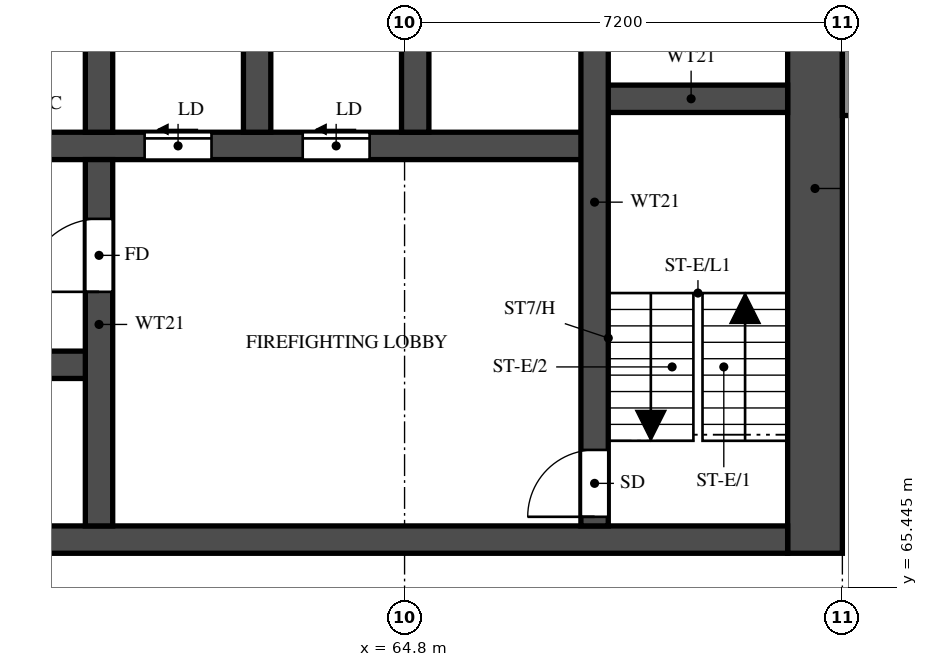
"""IFC4 building model, lengths in metres.
Left out: names, types, materials, properties, quantities, classifications, styles, units other than length and angle.
Written with IfcOpenShell. Run it as: python <this file> out.ifc"""

import sys

from ifc_helpers import new_model, si_unit, direction, frame, frame_2d, origin, place, context, subcontext, project, spatial, rectangle, extrude, element, fill, save


model = new_model("IFC4")
c1 = context("Model", 3, precision=1e-05, world=origin(), true_north=direction((0.0, 1.0)))
c2 = subcontext(c1, "Body", "Model", "MODEL_VIEW")
j1 = project(units=[si_unit("LENGTHUNIT", "METRE"), si_unit("PLANEANGLEUNIT", "RADIAN")], contexts=[c1])
p1 = place(None, origin())
s1 = spatial("IfcSite", under=j1, at=p1, CompositionType="ELEMENT")
p2 = place(p1, origin())
s2 = spatial("IfcBuilding", under=s1, at=p2, CompositionType="ELEMENT")
p3 = place(p2, frame((0.0, 0.0, 58.5)))
s3 = spatial("IfcBuildingStorey", under=s2, at=p3, CompositionType="ELEMENT", Elevation=58.5)
p4 = place(p3, frame((71.55, 66.0, 0.0), z_axis=(0.0, 0.0, 1.0), x_axis=(0.0, 1.0, 0.0)))
e1 = element("IfcWall", 1, at=p4, inside=s3, PredefinedType="SHEAR", context=c2, shape_type="SweptSolid", body=[
    extrude(rectangle(XDim=12.0, YDim=0.9, at=frame_2d((6.0, 0.0))), origin(), (0.0, 0.0, 1.0), 3.18),
])
p5 = place(p3, frame((29.7, 66.225, 0.0), z_axis=(0.0, 0.0, 1.0), x_axis=(1.0, 0.0, 0.0)))
e2 = element("IfcWall", 2, at=p5, inside=s3, PredefinedType="SHEAR", context=c2, shape_type="SweptSolid", body=[
    extrude(rectangle(XDim=41.4, YDim=0.45, at=frame_2d((20.7, 0.0))), origin(), (0.0, 0.0, 1.0), 3.18),
])
p6 = place(p5, frame((0.925, 0.0, 0.0)))
e3 = element("IfcOpeningElement", 3, at=p6, cuts=e2, PredefinedType="OPENING", context=c2, shape_type="SweptSolid", body=[
    extrude(rectangle(XDim=1.1, YDim=2.1, at=frame_2d((0.55, 1.05))), frame((0.0, 0.235, 0.0), z_axis=(0.0, -1.0, 0.0), x_axis=(1.0, 0.0, 0.0)), (0.0, 0.0, 1.0), 0.47),
])
p7 = place(p5, frame((3.738, 0.0, 0.0)))
e4 = element("IfcOpeningElement", 4, at=p7, cuts=e2, PredefinedType="OPENING", context=c2, shape_type="SweptSolid", body=[
    extrude(rectangle(XDim=1.8, YDim=2.1, at=frame_2d((0.9, 1.05))), frame((0.0, 0.235, 0.0), z_axis=(0.0, -1.0, 0.0), x_axis=(1.0, 0.0, 0.0)), (0.0, 0.0, 1.0), 0.47),
])
p8 = place(p3, frame((35.575, 69.1, 0.0), z_axis=(0.0, 0.0, 1.0), x_axis=(1.0, 0.0, 0.0)))
e5 = element("IfcWall", 5, at=p8, inside=s3, PredefinedType="SHEAR", context=c2, shape_type="SweptSolid", body=[
    extrude(rectangle(XDim=24.2, YDim=0.45, at=frame_2d((12.1, 0.0))), origin(), (0.0, 0.0, 1.0), 3.18),
])
p9 = place(p8, frame((1.05, 0.0, 0.0)))
e6 = element("IfcOpeningElement", 6, at=p9, cuts=e5, PredefinedType="OPENING", context=c2, shape_type="SweptSolid", body=[
    extrude(rectangle(XDim=1.1, YDim=2.1, at=frame_2d((0.55, 1.05))), frame((0.0, 0.235, 0.0), z_axis=(0.0, -1.0, 0.0), x_axis=(1.0, 0.0, 0.0)), (0.0, 0.0, 1.0), 0.47),
])
p10 = place(p8, frame((3.8, 0.0, 0.0)))
e7 = element("IfcOpeningElement", 7, at=p10, cuts=e5, PredefinedType="OPENING", context=c2, shape_type="SweptSolid", body=[
    extrude(rectangle(XDim=1.1, YDim=2.1, at=frame_2d((0.55, 1.05))), frame((0.0, 0.235, 0.0), z_axis=(0.0, -1.0, 0.0), x_axis=(1.0, 0.0, 0.0)), (0.0, 0.0, 1.0), 0.47),
])
p11 = place(p8, frame((6.55, 0.0, 0.0)))
e8 = element("IfcOpeningElement", 8, at=p11, cuts=e5, PredefinedType="OPENING", context=c2, shape_type="SweptSolid", body=[
    extrude(rectangle(XDim=1.1, YDim=2.1, at=frame_2d((0.55, 1.05))), frame((0.0, 0.235, 0.0), z_axis=(0.0, -1.0, 0.0), x_axis=(1.0, 0.0, 0.0)), (0.0, 0.0, 1.0), 0.47),
])
p12 = place(p8, frame((9.3, 0.0, 0.0)))
e9 = element("IfcOpeningElement", 9, at=p12, cuts=e5, PredefinedType="OPENING", context=c2, shape_type="SweptSolid", body=[
    extrude(rectangle(XDim=1.1, YDim=2.1, at=frame_2d((0.55, 1.05))), frame((0.0, 0.235, 0.0), z_axis=(0.0, -1.0, 0.0), x_axis=(1.0, 0.0, 0.0)), (0.0, 0.0, 1.0), 0.47),
])
p13 = place(p8, frame((12.05, 0.0, 0.0)))
e10 = element("IfcOpeningElement", 10, at=p13, cuts=e5, PredefinedType="OPENING", context=c2, shape_type="SweptSolid", body=[
    extrude(rectangle(XDim=1.1, YDim=2.1, at=frame_2d((0.55, 1.05))), frame((0.0, 0.235, 0.0), z_axis=(0.0, -1.0, 0.0), x_axis=(1.0, 0.0, 0.0)), (0.0, 0.0, 1.0), 0.47),
])
p14 = place(p8, frame((14.8, 0.0, 0.0)))
e11 = element("IfcOpeningElement", 11, at=p14, cuts=e5, PredefinedType="OPENING", context=c2, shape_type="SweptSolid", body=[
    extrude(rectangle(XDim=1.1, YDim=2.1, at=frame_2d((0.55, 1.05))), frame((0.0, 0.235, 0.0), z_axis=(0.0, -1.0, 0.0), x_axis=(1.0, 0.0, 0.0)), (0.0, 0.0, 1.0), 0.47),
])
p15 = place(p3, frame((32.875, 72.7, 0.0), z_axis=(0.0, 0.0, 1.0), x_axis=(1.0, 0.0, 0.0)))
e12 = element("IfcWall", 12, at=p15, inside=s3, PredefinedType="SHEAR", context=c2, shape_type="SweptSolid", body=[
    extrude(rectangle(XDim=35.05, YDim=0.45, at=frame_2d((17.525, 0.0))), origin(), (0.0, 0.0, 1.0), 3.18),
])
p16 = place(p15, frame((19.8, 0.0, 0.0)))
e13 = element("IfcOpeningElement", 13, at=p16, cuts=e12, PredefinedType="OPENING", context=c2, shape_type="SweptSolid", body=[
    extrude(rectangle(XDim=1.1, YDim=2.1, at=frame_2d((0.55, 1.05))), frame((0.0, 0.235, 0.0), z_axis=(0.0, -1.0, 0.0), x_axis=(1.0, 0.0, 0.0)), (0.0, 0.0, 1.0), 0.47),
])
p17 = place(p15, frame((27.65, 0.0, 0.0)))
e14 = element("IfcOpeningElement", 14, at=p17, cuts=e12, PredefinedType="OPENING", context=c2, shape_type="SweptSolid", body=[
    extrude(rectangle(XDim=1.1, YDim=2.1, at=frame_2d((0.55, 1.05))), frame((0.0, 0.235, 0.0), z_axis=(0.0, -1.0, 0.0), x_axis=(1.0, 0.0, 0.0)), (0.0, 0.0, 1.0), 0.47),
])
p18 = place(p15, frame((30.25, 0.0, 0.0)))
e15 = element("IfcOpeningElement", 15, at=p18, cuts=e12, PredefinedType="OPENING", context=c2, shape_type="SweptSolid", body=[
    extrude(rectangle(XDim=1.1, YDim=2.1, at=frame_2d((0.55, 1.05))), frame((0.0, 0.235, 0.0), z_axis=(0.0, -1.0, 0.0), x_axis=(1.0, 0.0, 0.0)), (0.0, 0.0, 1.0), 0.47),
])
p19 = place(p15, frame((3.75, 0.0, 0.0)))
e16 = element("IfcOpeningElement", 16, at=p19, cuts=e12, PredefinedType="OPENING", context=c2, shape_type="SweptSolid", body=[
    extrude(rectangle(XDim=1.1, YDim=2.1, at=frame_2d((0.55, 1.05))), frame((0.0, 0.235, 0.0), z_axis=(0.0, -1.0, 0.0), x_axis=(1.0, 0.0, 0.0)), (0.0, 0.0, 1.0), 0.47),
])
p20 = place(p15, frame((6.5, 0.0, 0.0)))
e17 = element("IfcOpeningElement", 17, at=p20, cuts=e12, PredefinedType="OPENING", context=c2, shape_type="SweptSolid", body=[
    extrude(rectangle(XDim=1.1, YDim=2.1, at=frame_2d((0.55, 1.05))), frame((0.0, 0.235, 0.0), z_axis=(0.0, -1.0, 0.0), x_axis=(1.0, 0.0, 0.0)), (0.0, 0.0, 1.0), 0.47),
])
p21 = place(p15, frame((9.25, 0.0, 0.0)))
e18 = element("IfcOpeningElement", 18, at=p21, cuts=e12, PredefinedType="OPENING", context=c2, shape_type="SweptSolid", body=[
    extrude(rectangle(XDim=1.1, YDim=2.1, at=frame_2d((0.55, 1.05))), frame((0.0, 0.235, 0.0), z_axis=(0.0, -1.0, 0.0), x_axis=(1.0, 0.0, 0.0)), (0.0, 0.0, 1.0), 0.47),
])
p22 = place(p15, frame((12.0, 0.0, 0.0)))
e19 = element("IfcOpeningElement", 19, at=p22, cuts=e12, PredefinedType="OPENING", context=c2, shape_type="SweptSolid", body=[
    extrude(rectangle(XDim=1.1, YDim=2.1, at=frame_2d((0.55, 1.05))), frame((0.0, 0.235, 0.0), z_axis=(0.0, -1.0, 0.0), x_axis=(1.0, 0.0, 0.0)), (0.0, 0.0, 1.0), 0.47),
])
p23 = place(p15, frame((14.75, 0.0, 0.0)))
e20 = element("IfcOpeningElement", 20, at=p23, cuts=e12, PredefinedType="OPENING", context=c2, shape_type="SweptSolid", body=[
    extrude(rectangle(XDim=1.1, YDim=2.1, at=frame_2d((0.55, 1.05))), frame((0.0, 0.235, 0.0), z_axis=(0.0, -1.0, 0.0), x_axis=(1.0, 0.0, 0.0)), (0.0, 0.0, 1.0), 0.47),
])
p24 = place(p15, frame((17.5, 0.0, 0.0)))
e21 = element("IfcOpeningElement", 21, at=p24, cuts=e12, PredefinedType="OPENING", context=c2, shape_type="SweptSolid", body=[
    extrude(rectangle(XDim=1.1, YDim=2.1, at=frame_2d((0.55, 1.05))), frame((0.0, 0.235, 0.0), z_axis=(0.0, -1.0, 0.0), x_axis=(1.0, 0.0, 0.0)), (0.0, 0.0, 1.0), 0.47),
])
p25 = place(p15, frame((0.913, 0.0, 0.0)))
e22 = element("IfcOpeningElement", 22, at=p25, cuts=e12, PredefinedType="OPENING", context=c2, shape_type="SweptSolid", body=[
    extrude(rectangle(XDim=1.1, YDim=2.1, at=frame_2d((0.55, 1.05))), frame((0.0, 0.235, 0.0), z_axis=(0.0, -1.0, 0.0), x_axis=(1.0, 0.0, 0.0)), (0.0, 0.0, 1.0), 0.47),
])
p26 = place(p3, frame((67.925, 73.475, 0.0), z_axis=(0.0, 0.0, 1.0), x_axis=(1.0, 0.0, 0.0)))
e23 = element("IfcWall", 23, at=p26, inside=s3, PredefinedType="SHEAR", context=c2, shape_type="SweptSolid", body=[
    extrude(rectangle(XDim=3.175, YDim=0.45, at=frame_2d((1.587, 0.0))), origin(), (0.0, 0.0, 1.0), 3.18),
])
p27 = place(p3, frame((67.925, 66.45, 0.0), z_axis=(0.0, 0.0, 1.0), x_axis=(0.0, 1.0, 0.0)))
e24 = element("IfcWall", 24, at=p27, inside=s3, PredefinedType="SHEAR", context=c2, shape_type="SweptSolid", body=[
    extrude(rectangle(XDim=10.65, YDim=0.45, at=frame_2d((5.325, 0.0))), origin(), (0.0, 0.0, 1.0), 3.18),
])
p28 = place(p27, frame((0.15, 0.0, 0.0)))
e25 = element("IfcOpeningElement", 25, at=p28, cuts=e24, PredefinedType="OPENING", context=c2, shape_type="SweptSolid", body=[
    extrude(rectangle(XDim=1.1, YDim=2.1, at=frame_2d((0.55, 1.05))), frame((0.0, 0.235, 0.0), z_axis=(0.0, -1.0, 0.0), x_axis=(1.0, 0.0, 0.0)), (0.0, 0.0, 1.0), 0.47),
])
p29 = place(p3, frame((59.775, 66.45, 0.0), z_axis=(0.0, 0.0, 1.0), x_axis=(0.0, 1.0, 0.0)))
e26 = element("IfcWall", 26, at=p29, inside=s3, PredefinedType="SHEAR", context=c2, shape_type="SweptSolid", body=[
    extrude(rectangle(XDim=6.025, YDim=0.45, at=frame_2d((3.013, 0.0))), origin(), (0.0, 0.0, 1.0), 3.18),
])
p30 = place(p29, frame((3.85, 0.0, 0.0)))
e27 = element("IfcOpeningElement", 27, at=p30, cuts=e26, PredefinedType="OPENING", context=c2, shape_type="SweptSolid", body=[
    extrude(rectangle(XDim=1.2, YDim=2.1, at=frame_2d((0.6, 1.05))), frame((0.0, 0.235, 0.0), z_axis=(0.0, -1.0, 0.0), x_axis=(1.0, 0.0, 0.0)), (0.0, 0.0, 1.0), 0.47),
])
for number, where, z_axis, x_axis in (
    (28, (59.775, 72.925, 0.0), (0.0, 0.0, 1.0), (0.0, 1.0, 0.0)),
    (29, (62.375, 72.925, 0.0), (0.0, 0.0, 1.0), (0.0, 1.0, 0.0)),
    (30, (64.975, 72.925, 0.0), (0.0, 0.0, 1.0), (0.0, 1.0, 0.0)),
):
    element("IfcWall", number, at=place(p3, frame(where, z_axis=z_axis, x_axis=x_axis)), inside=s3, PredefinedType="SHEAR", context=c2, shape_type="SweptSolid", body=[
        extrude(rectangle(XDim=2.95, YDim=0.45, at=frame_2d((1.475, 0.0))), origin(), (0.0, 0.0, 1.0), 3.18),
    ])
p31 = place(p3, frame((72.1, 73.2, 0.0), z_axis=(0.0, 0.0, 1.0), x_axis=(0.0, 1.0, 0.0)))
e31 = element("IfcWall", 31, at=p31, inside=s3, PredefinedType="SOLIDWALL", context=c2, shape_type="SweptSolid", body=[
    extrude(rectangle(XDim=4.8, YDim=0.2, at=frame_2d((2.4, 0.0))), origin(), (0.0, 0.0, 1.0), 3.18),
])
p32 = place(p28, origin())
e32 = element("IfcDoor", 32, at=p32, inside=s3, OperationType="SINGLE_SWING_LEFT", PredefinedType="DOOR", context=c2, shape_type="SweptSolid", body=[
    extrude(rectangle(XDim=1.1, YDim=2.1, at=frame_2d((0.55, 1.05))), frame((0.0, 0.025, 0.0), z_axis=(0.0, -1.0, 0.0), x_axis=(1.0, 0.0, 0.0)), (0.0, 0.0, 1.0), 0.05),
])
fill(e25, e32)
p33 = place(p30, origin())
e33 = element("IfcDoor", 33, at=p33, inside=s3, OperationType="SINGLE_SWING_RIGHT", PredefinedType="DOOR", context=c2, shape_type="SweptSolid", body=[
    extrude(rectangle(XDim=1.2, YDim=2.1, at=frame_2d((0.6, 1.05))), frame((0.0, 0.025, 0.0), z_axis=(0.0, -1.0, 0.0), x_axis=(1.0, 0.0, 0.0)), (0.0, 0.0, 1.0), 0.05),
])
fill(e27, e33)
p34 = place(p17, origin())
e34 = element("IfcDoor", 34, at=p34, inside=s3, OperationType="SLIDING_TO_LEFT", PredefinedType="DOOR", context=c2, shape_type="SweptSolid", body=[
    extrude(rectangle(XDim=1.1, YDim=2.1, at=frame_2d((0.55, 1.05))), frame((0.0, 0.025, 0.0), z_axis=(0.0, -1.0, 0.0), x_axis=(1.0, 0.0, 0.0)), (0.0, 0.0, 1.0), 0.05),
])
fill(e14, e34)
p35 = place(p18, origin())
e35 = element("IfcDoor", 35, at=p35, inside=s3, OperationType="SLIDING_TO_LEFT", PredefinedType="DOOR", context=c2, shape_type="SweptSolid", body=[
    extrude(rectangle(XDim=1.1, YDim=2.1, at=frame_2d((0.55, 1.05))), frame((0.0, 0.025, 0.0), z_axis=(0.0, -1.0, 0.0), x_axis=(1.0, 0.0, 0.0)), (0.0, 0.0, 1.0), 0.05),
])
fill(e15, e35)
save(model, sys.argv[1])
